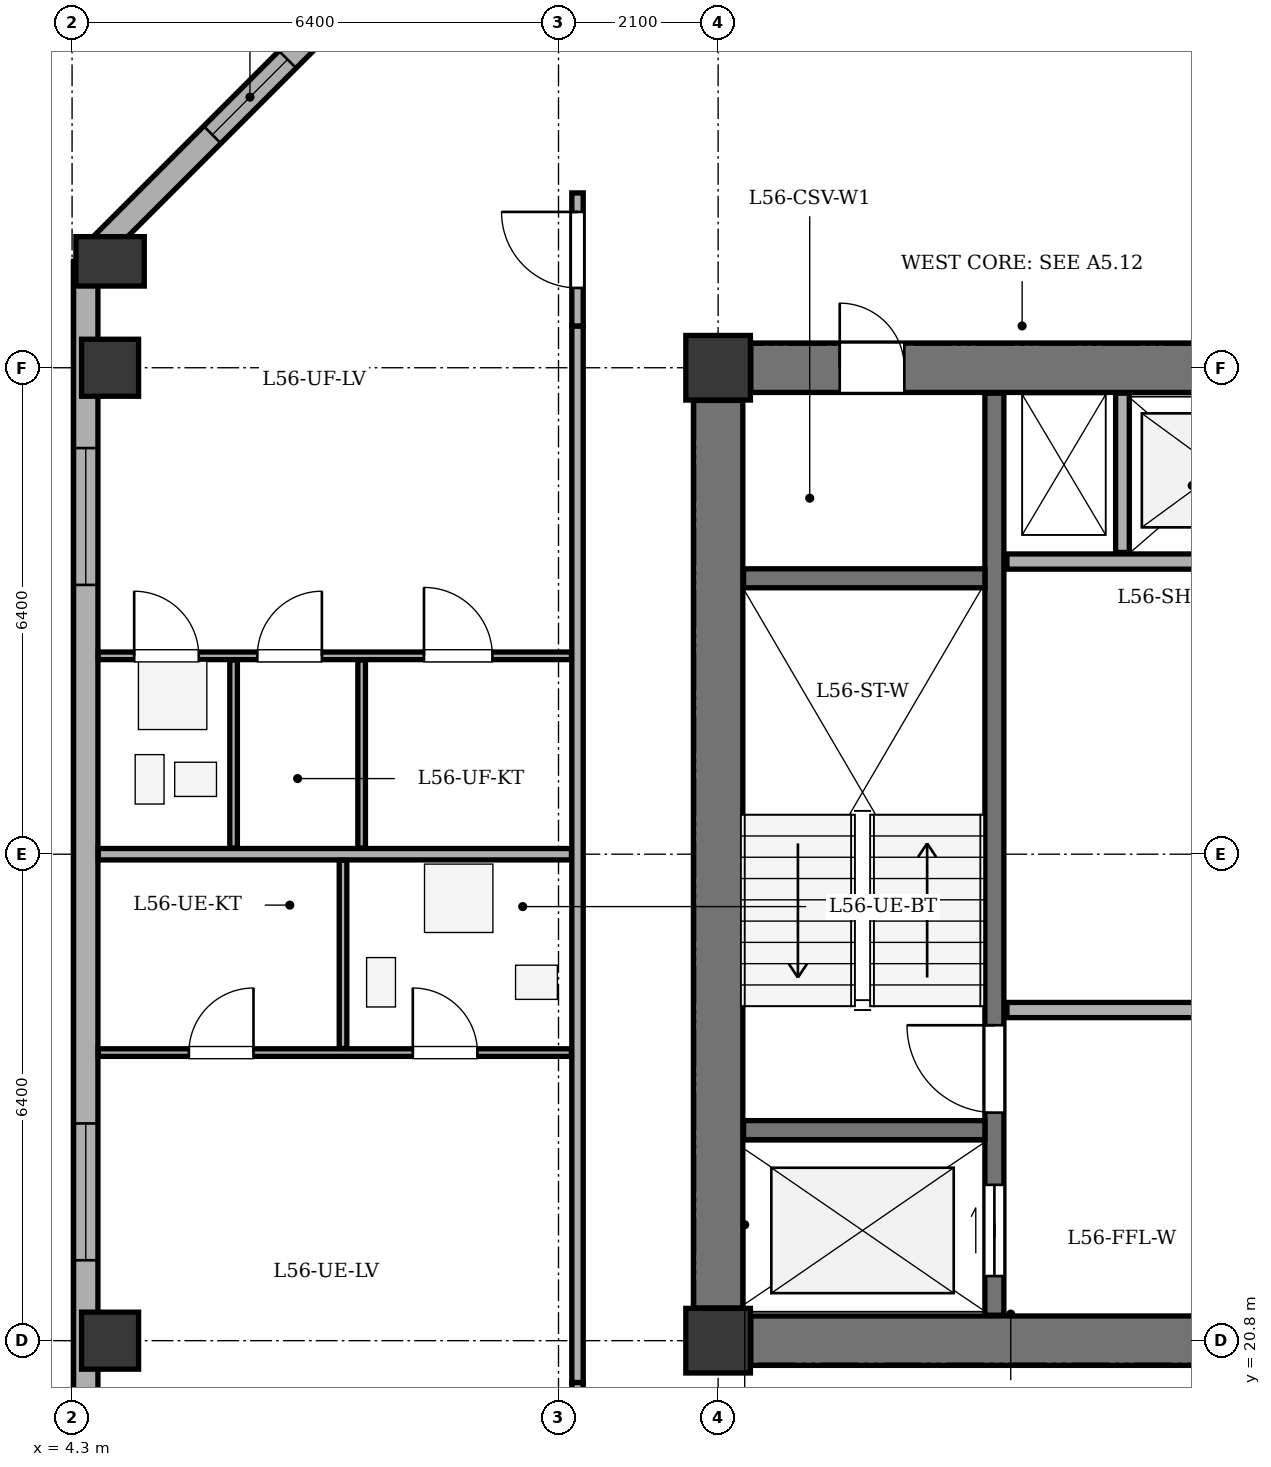
"""IFC4 building model, lengths in metres.
Left out: names, types, materials, properties, quantities, classifications, styles, units other than length and angle.
Written with IfcOpenShell. Run it as: python <this file> out.ifc"""

import sys

from ifc_helpers import new_model, si_unit, direction, frame, frame_2d, origin, origin_2d, place, context, subcontext, project, spatial, rectangle, extrude, element, fill, save


model = new_model("IFC4")
c1 = context("Model", 3, precision=1e-05, world=origin(), true_north=direction((0.0, 1.0)))
c2 = subcontext(c1, "Body", "Model", "MODEL_VIEW")
j1 = project(units=[si_unit("LENGTHUNIT", "METRE"), si_unit("PLANEANGLEUNIT", "RADIAN")], contexts=[c1])
p1 = place(None, origin())
s1 = spatial("IfcSite", under=j1, at=p1, CompositionType="ELEMENT")
p2 = place(p1, origin())
s2 = spatial("IfcBuilding", under=s1, at=p2, CompositionType="ELEMENT")
p3 = place(p2, frame((0.0, 0.0, 217.7)))
s3 = spatial("IfcBuildingStorey", under=s2, at=p3, CompositionType="ELEMENT", Elevation=217.7)
for number, where, z_axis, x_axis in (
    (1, (12.8, 20.8, 0.0), (0.0, 0.0, 1.0), (1.0, 0.0, 0.0)),
    (2, (12.8, 33.6, 0.0), (0.0, 0.0, 1.0), (1.0, 0.0, 0.0)),
):
    element("IfcColumn", number, at=place(p3, frame(where, z_axis=z_axis, x_axis=x_axis)), inside=s3, PredefinedType="COLUMN", context=c2, shape_type="SweptSolid", body=[
        extrude(rectangle(XDim=0.85, YDim=0.85, at=origin_2d()), origin(), (0.0, 0.0, 1.0), 3.4),
    ])
for number, where, z_axis, x_axis in (
    (3, (4.8, 20.8, 0.0), (0.0, 0.0, 1.0), (1.0, 0.0, 0.0)),
    (4, (4.8, 33.6, 0.0), (0.0, 0.0, 1.0), (1.0, 0.0, 0.0)),
):
    element("IfcColumn", number, at=place(p3, frame(where, z_axis=z_axis, x_axis=x_axis)), inside=s3, PredefinedType="COLUMN", context=c2, shape_type="SweptSolid", body=[
        extrude(rectangle(XDim=0.75, YDim=0.75, at=origin_2d()), origin(), (0.0, 0.0, 1.0), 3.4),
    ])
p4 = place(p3, frame((4.8, 35.0, 0.0), z_axis=(0.0, 0.0, 1.0), x_axis=(1.0, 0.0, 0.0)))
e5 = element("IfcColumn", 5, at=p4, inside=s3, PredefinedType="COLUMN", context=c2, shape_type="SweptSolid", body=[
    extrude(rectangle(XDim=0.65, YDim=0.9, at=origin_2d()), origin(), (0.0, 0.0, 1.0), 3.4),
])
p5 = place(p3, frame((4.48, 7.2, 0.0), z_axis=(0.0, 0.0, 1.0), x_axis=(0.0, 1.0, 0.0)))
e6 = element("IfcWall", 6, at=p5, inside=s3, PredefinedType="STANDARD", context=c2, shape_type="SweptSolid", body=[
    extrude(rectangle(XDim=27.8, YDim=0.32, at=frame_2d((13.9, 0.0))), origin(), (0.0, 0.0, 1.0), 2.725),
])
p6 = place(p5, frame((1.198, 0.0, 0.75)))
e7 = element("IfcOpeningElement", 7, at=p6, cuts=e6, PredefinedType="OPENING", context=c2, shape_type="SweptSolid", body=[
    extrude(rectangle(XDim=1.8, YDim=1.7, at=frame_2d((0.9, 0.85))), frame((0.0, 0.17, 0.0), z_axis=(0.0, -1.0, 0.0), x_axis=(1.0, 0.0, 0.0)), (0.0, 0.0, 1.0), 0.34),
])
p7 = place(p5, frame((3.78, 0.0, 0.75)))
e8 = element("IfcOpeningElement", 8, at=p7, cuts=e6, PredefinedType="OPENING", context=c2, shape_type="SweptSolid", body=[
    extrude(rectangle(XDim=1.8, YDim=1.7, at=frame_2d((0.9, 0.85))), frame((0.0, 0.17, 0.0), z_axis=(0.0, -1.0, 0.0), x_axis=(1.0, 0.0, 0.0)), (0.0, 0.0, 1.0), 0.34),
])
p8 = place(p5, frame((7.711, 0.0, 0.75)))
e9 = element("IfcOpeningElement", 9, at=p8, cuts=e6, PredefinedType="OPENING", context=c2, shape_type="SweptSolid", body=[
    extrude(rectangle(XDim=1.8, YDim=1.7, at=frame_2d((0.9, 0.85))), frame((0.0, 0.17, 0.0), z_axis=(0.0, -1.0, 0.0), x_axis=(1.0, 0.0, 0.0)), (0.0, 0.0, 1.0), 0.34),
])
p9 = place(p5, frame((10.542, 0.0, 0.75)))
e10 = element("IfcOpeningElement", 10, at=p9, cuts=e6, PredefinedType="OPENING", context=c2, shape_type="SweptSolid", body=[
    extrude(rectangle(XDim=1.8, YDim=1.7, at=frame_2d((0.9, 0.85))), frame((0.0, 0.17, 0.0), z_axis=(0.0, -1.0, 0.0), x_axis=(1.0, 0.0, 0.0)), (0.0, 0.0, 1.0), 0.34),
])
p10 = place(p5, frame((14.658, 0.0, 0.75)))
e11 = element("IfcOpeningElement", 11, at=p10, cuts=e6, PredefinedType="OPENING", context=c2, shape_type="SweptSolid", body=[
    extrude(rectangle(XDim=1.8, YDim=1.7, at=frame_2d((0.9, 0.85))), frame((0.0, 0.17, 0.0), z_axis=(0.0, -1.0, 0.0), x_axis=(1.0, 0.0, 0.0)), (0.0, 0.0, 1.0), 0.34),
])
p11 = place(p5, frame((23.543, 0.0, 0.75)))
e12 = element("IfcOpeningElement", 12, at=p11, cuts=e6, PredefinedType="OPENING", context=c2, shape_type="SweptSolid", body=[
    extrude(rectangle(XDim=1.8, YDim=1.7, at=frame_2d((0.9, 0.85))), frame((0.0, 0.17, 0.0), z_axis=(0.0, -1.0, 0.0), x_axis=(1.0, 0.0, 0.0)), (0.0, 0.0, 1.0), 0.34),
])
p12 = place(p3, frame((4.48, 35.0, 0.0), z_axis=(0.0, 0.0, 1.0), x_axis=(0.707106781187, 0.707106781187, 0.0)))
e13 = element("IfcWall", 13, at=p12, inside=s3, PredefinedType="STANDARD", context=c2, shape_type="SweptSolid", body=[
    extrude(rectangle(XDim=6.11, YDim=0.32, at=frame_2d((3.055, 0.0))), origin(), (0.0, 0.0, 1.0), 2.725),
])
p13 = place(p12, frame((2.355, 0.0, 0.75)))
e14 = element("IfcOpeningElement", 14, at=p13, cuts=e13, PredefinedType="OPENING", context=c2, shape_type="SweptSolid", body=[
    extrude(rectangle(XDim=1.4, YDim=1.65, at=frame_2d((0.7, 0.825))), frame((0.0, 0.17, 0.0), z_axis=(0.0, -1.0, 0.0), x_axis=(1.0, 0.0, 0.0)), (0.0, 0.0, 1.0), 0.34),
])
p14 = place(p3, frame((12.8, 21.23, 0.0), z_axis=(0.0, 0.0, 1.0), x_axis=(0.0, 1.0, 0.0)))
e15 = element("IfcWall", 15, at=p14, inside=s3, PredefinedType="SHEAR", context=c2, shape_type="SweptSolid", body=[
    extrude(rectangle(XDim=11.94, YDim=0.65, at=frame_2d((5.97, 0.0))), origin(), (0.0, 0.0, 1.0), 3.1),
])
p15 = place(p3, frame((13.23, 20.8, 0.0), z_axis=(0.0, 0.0, 1.0), x_axis=(1.0, 0.0, 0.0)))
e16 = element("IfcWall", 16, at=p15, inside=s3, PredefinedType="SHEAR", context=c2, shape_type="SweptSolid", body=[
    extrude(rectangle(XDim=7.14, YDim=0.65, at=frame_2d((3.57, 0.0))), origin(), (0.0, 0.0, 1.0), 3.1),
])
p16 = place(p3, frame((13.23, 33.6, 0.0), z_axis=(0.0, 0.0, 1.0), x_axis=(1.0, 0.0, 0.0)))
e17 = element("IfcWall", 17, at=p16, inside=s3, PredefinedType="SHEAR", context=c2, shape_type="SweptSolid", body=[
    extrude(rectangle(XDim=7.14, YDim=0.65, at=frame_2d((3.57, 0.0))), origin(), (0.0, 0.0, 1.0), 3.1),
])
p17 = place(p16, frame((1.17, 0.0, 0.0)))
e18 = element("IfcOpeningElement", 18, at=p17, cuts=e17, PredefinedType="OPENING", context=c2, shape_type="SweptSolid", body=[
    extrude(rectangle(XDim=0.85, YDim=2.02, at=frame_2d((0.425, 1.01))), frame((0.0, 0.335, 0.0), z_axis=(0.0, -1.0, 0.0), x_axis=(1.0, 0.0, 0.0)), (0.0, 0.0, 1.0), 0.67),
])
p18 = place(p3, frame((16.435, 21.135, 0.0), z_axis=(0.0, 0.0, 1.0), x_axis=(0.0, 1.0, 0.0)))
e19 = element("IfcWall", 19, at=p18, inside=s3, PredefinedType="SHEAR", context=c2, shape_type="SweptSolid", body=[
    extrude(rectangle(XDim=12.13, YDim=0.25, at=frame_2d((6.065, 0.0))), origin(), (0.0, 0.0, 1.0), 3.1),
])
p19 = place(p18, frame((0.515, 0.0, 0.0)))
e20 = element("IfcOpeningElement", 20, at=p19, cuts=e19, PredefinedType="OPENING", context=c2, shape_type="SweptSolid", body=[
    extrude(rectangle(XDim=1.2, YDim=2.15, at=frame_2d((0.6, 1.075))), frame((0.0, 0.135, 0.0), z_axis=(0.0, -1.0, 0.0), x_axis=(1.0, 0.0, 0.0)), (0.0, 0.0, 1.0), 0.27),
])
p20 = place(p18, frame((2.665, 0.0, 0.0)))
e21 = element("IfcOpeningElement", 21, at=p20, cuts=e19, PredefinedType="OPENING", context=c2, shape_type="SweptSolid", body=[
    extrude(rectangle(XDim=1.15, YDim=2.15, at=frame_2d((0.575, 1.075))), frame((0.0, 0.135, 0.0), z_axis=(0.0, -1.0, 0.0), x_axis=(1.0, 0.0, 0.0)), (0.0, 0.0, 1.0), 0.27),
])
for number, where, z_axis, x_axis in (
    (22, (13.135, 23.57, 0.0), (0.0, 0.0, 1.0), (1.0, 0.0, 0.0)),
    (23, (13.135, 30.83, 0.0), (0.0, 0.0, 1.0), (1.0, 0.0, 0.0)),
):
    element("IfcWall", number, at=place(p3, frame(where, z_axis=z_axis, x_axis=x_axis)), inside=s3, PredefinedType="SHEAR", context=c2, shape_type="SweptSolid", body=[
        extrude(rectangle(XDim=3.175, YDim=0.25, at=frame_2d((1.587, 0.0))), origin(), (0.0, 0.0, 1.0), 3.1),
    ])
for number, where, z_axis, x_axis in (
    (24, (16.6, 25.15, 0.0), (0.0, 0.0, 1.0), (1.0, 0.0, 0.0)),
    (25, (16.6, 31.05, 0.0), (0.0, 0.0, 1.0), (1.0, 0.0, 0.0)),
):
    element("IfcWall", number, at=place(p3, frame(where, z_axis=z_axis, x_axis=x_axis)), inside=s3, PredefinedType="SOLIDWALL", context=c2, shape_type="SweptSolid", body=[
        extrude(rectangle(XDim=3.85, YDim=0.2, at=frame_2d((1.925, 0.0))), origin(), (0.0, 0.0, 1.0), 3.1),
    ])
p21 = place(p3, frame((18.12, 31.17, 0.0), z_axis=(0.0, 0.0, 1.0), x_axis=(0.0, 1.0, 0.0)))
e26 = element("IfcWall", 26, at=p21, inside=s3, PredefinedType="PARTITIONING", context=c2, shape_type="SweptSolid", body=[
    extrude(rectangle(XDim=2.095, YDim=0.18, at=frame_2d((1.047, 0.0))), origin(), (0.0, 0.0, 1.0), 3.1),
])
p22 = place(p3, frame((10.95, 18.46, 0.0), z_axis=(0.0, 0.0, 1.0), x_axis=(0.0, 1.0, 0.0)))
e27 = element("IfcWall", 27, at=p22, inside=s3, PredefinedType="PARTITIONING", context=c2, shape_type="SweptSolid", body=[
    extrude(rectangle(XDim=1.79, YDim=0.15, at=frame_2d((0.895, 0.0))), origin(), (0.0, 0.0, 1.0), 3.1),
])
p23 = place(p22, frame((0.375, 0.0, 0.0)))
e28 = element("IfcOpeningElement", 28, at=p23, cuts=e27, PredefinedType="OPENING", context=c2, shape_type="SweptSolid", body=[
    extrude(rectangle(XDim=1.0, YDim=2.1, at=frame_2d((0.5, 1.05))), frame((0.0, 0.085, 0.0), z_axis=(0.0, -1.0, 0.0), x_axis=(1.0, 0.0, 0.0)), (0.0, 0.0, 1.0), 0.17),
])
p24 = place(p3, frame((10.95, 20.25, 0.0), z_axis=(0.0, 0.0, 1.0), x_axis=(0.0, 1.0, 0.0)))
e29 = element("IfcWall", 29, at=p24, inside=s3, PredefinedType="PARTITIONING", context=c2, shape_type="SweptSolid", body=[
    extrude(rectangle(XDim=13.9, YDim=0.15, at=frame_2d((6.95, 0.0))), origin(), (0.0, 0.0, 1.0), 3.1),
])
p25 = place(p3, frame((10.95, 34.15, 0.0), z_axis=(0.0, 0.0, 1.0), x_axis=(0.0, 1.0, 0.0)))
e30 = element("IfcWall", 30, at=p25, inside=s3, PredefinedType="PARTITIONING", context=c2, shape_type="SweptSolid", body=[
    extrude(rectangle(XDim=1.75, YDim=0.15, at=frame_2d((0.875, 0.0))), origin(), (0.0, 0.0, 1.0), 3.1),
])
p26 = place(p25, frame((0.5, 0.0, 0.0)))
e31 = element("IfcOpeningElement", 31, at=p26, cuts=e30, PredefinedType="OPENING", context=c2, shape_type="SweptSolid", body=[
    extrude(rectangle(XDim=1.0, YDim=2.1, at=frame_2d((0.5, 1.05))), frame((0.0, 0.085, 0.0), z_axis=(0.0, -1.0, 0.0), x_axis=(1.0, 0.0, 0.0)), (0.0, 0.0, 1.0), 0.17),
])
p27 = place(p3, frame((4.645, 27.2, 0.0), z_axis=(0.0, 0.0, 1.0), x_axis=(1.0, 0.0, 0.0)))
e32 = element("IfcWall", 32, at=p27, inside=s3, PredefinedType="PARTITIONING", context=c2, shape_type="SweptSolid", body=[
    extrude(rectangle(XDim=6.225, YDim=0.15, at=frame_2d((3.113, 0.0))), origin(), (0.0, 0.0, 1.0), 2.725),
])
p28 = place(p3, frame((4.645, 24.59, 0.0), z_axis=(0.0, 0.0, 1.0), x_axis=(1.0, 0.0, 0.0)))
e33 = element("IfcWall", 33, at=p28, inside=s3, PredefinedType="PARTITIONING", context=c2, shape_type="SweptSolid", body=[
    extrude(rectangle(XDim=6.225, YDim=0.1, at=frame_2d((3.113, 0.0))), origin(), (0.0, 0.0, 1.0), 3.1),
])
p29 = place(p28, frame((1.192, 0.0, 0.0)))
e34 = element("IfcOpeningElement", 34, at=p29, cuts=e33, PredefinedType="OPENING", context=c2, shape_type="SweptSolid", body=[
    extrude(rectangle(XDim=0.85, YDim=2.05, at=frame_2d((0.425, 1.025))), frame((0.0, 0.06, 0.0), z_axis=(0.0, -1.0, 0.0), x_axis=(1.0, 0.0, 0.0)), (0.0, 0.0, 1.0), 0.12),
])
p30 = place(p28, frame((4.138, 0.0, 0.0)))
e35 = element("IfcOpeningElement", 35, at=p30, cuts=e33, PredefinedType="OPENING", context=c2, shape_type="SweptSolid", body=[
    extrude(rectangle(XDim=0.85, YDim=2.05, at=frame_2d((0.425, 1.025))), frame((0.0, 0.06, 0.0), z_axis=(0.0, -1.0, 0.0), x_axis=(1.0, 0.0, 0.0)), (0.0, 0.0, 1.0), 0.12),
])
p31 = place(p3, frame((7.865, 24.645, 0.0), z_axis=(0.0, 0.0, 1.0), x_axis=(0.0, 1.0, 0.0)))
e36 = element("IfcWall", 36, at=p31, inside=s3, PredefinedType="PARTITIONING", context=c2, shape_type="SweptSolid", body=[
    extrude(rectangle(XDim=2.475, YDim=0.1, at=frame_2d((1.238, 0.0))), origin(), (0.0, 0.0, 1.0), 3.1),
])
p32 = place(p3, frame((4.645, 29.81, 0.0), z_axis=(0.0, 0.0, 1.0), x_axis=(1.0, 0.0, 0.0)))
e37 = element("IfcWall", 37, at=p32, inside=s3, PredefinedType="PARTITIONING", context=c2, shape_type="SweptSolid", body=[
    extrude(rectangle(XDim=6.225, YDim=0.1, at=frame_2d((3.113, 0.0))), origin(), (0.0, 0.0, 1.0), 3.1),
])
p33 = place(p32, frame((0.472, 0.0, 0.0)))
e38 = element("IfcOpeningElement", 38, at=p33, cuts=e37, PredefinedType="OPENING", context=c2, shape_type="SweptSolid", body=[
    extrude(rectangle(XDim=0.85, YDim=2.05, at=frame_2d((0.425, 1.025))), frame((0.0, 0.06, 0.0), z_axis=(0.0, -1.0, 0.0), x_axis=(1.0, 0.0, 0.0)), (0.0, 0.0, 1.0), 0.12),
])
p34 = place(p32, frame((2.092, 0.0, 0.0)))
e39 = element("IfcOpeningElement", 39, at=p34, cuts=e37, PredefinedType="OPENING", context=c2, shape_type="SweptSolid", body=[
    extrude(rectangle(XDim=0.85, YDim=2.05, at=frame_2d((0.425, 1.025))), frame((0.0, 0.06, 0.0), z_axis=(0.0, -1.0, 0.0), x_axis=(1.0, 0.0, 0.0)), (0.0, 0.0, 1.0), 0.12),
])
p35 = place(p32, frame((4.285, 0.0, 0.0)))
e40 = element("IfcOpeningElement", 40, at=p35, cuts=e37, PredefinedType="OPENING", context=c2, shape_type="SweptSolid", body=[
    extrude(rectangle(XDim=0.9, YDim=2.05, at=frame_2d((0.45, 1.025))), frame((0.0, 0.06, 0.0), z_axis=(0.0, -1.0, 0.0), x_axis=(1.0, 0.0, 0.0)), (0.0, 0.0, 1.0), 0.12),
])
for number, where, z_axis, x_axis in (
    (41, (6.425, 27.28, 0.0), (0.0, 0.0, 1.0), (0.0, 1.0, 0.0)),
    (42, (8.11, 27.28, 0.0), (0.0, 0.0, 1.0), (0.0, 1.0, 0.0)),
):
    element("IfcWall", number, at=place(p3, frame(where, z_axis=z_axis, x_axis=x_axis)), inside=s3, PredefinedType="PARTITIONING", context=c2, shape_type="SweptSolid", body=[
        extrude(rectangle(XDim=2.475, YDim=0.1, at=frame_2d((1.237, 0.0))), origin(), (0.0, 0.0, 1.0), 3.1),
    ])
p36 = place(p10, origin())
e43 = element("IfcWindow", 43, at=p36, inside=s3, PartitioningType="SINGLE_PANEL", PredefinedType="WINDOW", context=c2, shape_type="SweptSolid", body=[
    extrude(rectangle(XDim=1.8, YDim=1.7, at=frame_2d((0.9, 0.85))), frame((0.0, -0.01, 0.0), z_axis=(0.0, -1.0, 0.0), x_axis=(1.0, 0.0, 0.0)), (0.0, 0.0, 1.0), 0.06),
])
fill(e11, e43)
p37 = place(p11, origin())
e44 = element("IfcWindow", 44, at=p37, inside=s3, PartitioningType="SINGLE_PANEL", PredefinedType="WINDOW", context=c2, shape_type="SweptSolid", body=[
    extrude(rectangle(XDim=1.8, YDim=1.7, at=frame_2d((0.9, 0.85))), frame((0.0, -0.01, 0.0), z_axis=(0.0, -1.0, 0.0), x_axis=(1.0, 0.0, 0.0)), (0.0, 0.0, 1.0), 0.06),
])
fill(e12, e44)
p38 = place(p13, origin())
e45 = element("IfcWindow", 45, at=p38, inside=s3, PartitioningType="SINGLE_PANEL", PredefinedType="WINDOW", context=c2, shape_type="SweptSolid", body=[
    extrude(rectangle(XDim=1.4, YDim=1.65, at=frame_2d((0.7, 0.825))), frame((0.0, -0.01, 0.0), z_axis=(0.0, -1.0, 0.0), x_axis=(1.0, 0.0, 0.0)), (0.0, 0.0, 1.0), 0.06),
])
fill(e14, e45)
p39 = place(p17, origin())
e46 = element("IfcDoor", 46, at=p39, inside=s3, OperationType="SINGLE_SWING_LEFT", PredefinedType="DOOR", context=c2, shape_type="SweptSolid", body=[
    extrude(rectangle(XDim=0.85, YDim=2.02, at=frame_2d((0.425, 1.01))), frame((0.0, 0.025, 0.0), z_axis=(0.0, -1.0, 0.0), x_axis=(1.0, 0.0, 0.0)), (0.0, 0.0, 1.0), 0.05),
])
fill(e18, e46)
p40 = place(p19, origin())
e47 = element("IfcDoor", 47, at=p40, inside=s3, OperationType="DOUBLE_DOOR_SLIDING", PredefinedType="DOOR", context=c2, shape_type="SweptSolid", body=[
    extrude(rectangle(XDim=1.2, YDim=2.15, at=frame_2d((0.6, 1.075))), frame((0.0, 0.025, 0.0), z_axis=(0.0, -1.0, 0.0), x_axis=(1.0, 0.0, 0.0)), (0.0, 0.0, 1.0), 0.05),
])
fill(e20, e47)
p41 = place(p20, origin())
e48 = element("IfcDoor", 48, at=p41, inside=s3, OperationType="SINGLE_SWING_RIGHT", PredefinedType="DOOR", context=c2, shape_type="SweptSolid", body=[
    extrude(rectangle(XDim=1.15, YDim=2.15, at=frame_2d((0.575, 1.075))), frame((0.0, 0.025, 0.0), z_axis=(0.0, -1.0, 0.0), x_axis=(1.0, 0.0, 0.0)), (0.0, 0.0, 1.0), 0.05),
])
fill(e21, e48)
p42 = place(p29, origin())
e49 = element("IfcDoor", 49, at=p42, inside=s3, OperationType="SINGLE_SWING_RIGHT", PredefinedType="DOOR", context=c2, shape_type="SweptSolid", body=[
    extrude(rectangle(XDim=0.85, YDim=2.05, at=frame_2d((0.425, 1.025))), frame((0.0, 0.025, 0.0), z_axis=(0.0, -1.0, 0.0), x_axis=(1.0, 0.0, 0.0)), (0.0, 0.0, 1.0), 0.05),
])
fill(e34, e49)
p43 = place(p30, origin())
e50 = element("IfcDoor", 50, at=p43, inside=s3, OperationType="SINGLE_SWING_LEFT", PredefinedType="DOOR", context=c2, shape_type="SweptSolid", body=[
    extrude(rectangle(XDim=0.85, YDim=2.05, at=frame_2d((0.425, 1.025))), frame((0.0, 0.025, 0.0), z_axis=(0.0, -1.0, 0.0), x_axis=(1.0, 0.0, 0.0)), (0.0, 0.0, 1.0), 0.05),
])
fill(e35, e50)
p44 = place(p26, origin())
e51 = element("IfcDoor", 51, at=p44, inside=s3, OperationType="SINGLE_SWING_RIGHT", PredefinedType="DOOR", context=c2, shape_type="SweptSolid", body=[
    extrude(rectangle(XDim=1.0, YDim=2.1, at=frame_2d((0.5, 1.05))), frame((0.0, 0.025, 0.0), z_axis=(0.0, -1.0, 0.0), x_axis=(1.0, 0.0, 0.0)), (0.0, 0.0, 1.0), 0.05),
])
fill(e31, e51)
p45 = place(p33, origin())
e52 = element("IfcDoor", 52, at=p45, inside=s3, OperationType="SINGLE_SWING_LEFT", PredefinedType="DOOR", context=c2, shape_type="SweptSolid", body=[
    extrude(rectangle(XDim=0.85, YDim=2.05, at=frame_2d((0.425, 1.025))), frame((0.0, 0.025, 0.0), z_axis=(0.0, -1.0, 0.0), x_axis=(1.0, 0.0, 0.0)), (0.0, 0.0, 1.0), 0.05),
])
fill(e38, e52)
p46 = place(p34, origin())
e53 = element("IfcDoor", 53, at=p46, inside=s3, OperationType="SINGLE_SWING_RIGHT", PredefinedType="DOOR", context=c2, shape_type="SweptSolid", body=[
    extrude(rectangle(XDim=0.85, YDim=2.05, at=frame_2d((0.425, 1.025))), frame((0.0, 0.025, 0.0), z_axis=(0.0, -1.0, 0.0), x_axis=(1.0, 0.0, 0.0)), (0.0, 0.0, 1.0), 0.05),
])
fill(e39, e53)
p47 = place(p35, origin())
e54 = element("IfcDoor", 54, at=p47, inside=s3, OperationType="SINGLE_SWING_LEFT", PredefinedType="DOOR", context=c2, shape_type="SweptSolid", body=[
    extrude(rectangle(XDim=0.9, YDim=2.05, at=frame_2d((0.45, 1.025))), frame((0.0, 0.025, 0.0), z_axis=(0.0, -1.0, 0.0), x_axis=(1.0, 0.0, 0.0)), (0.0, 0.0, 1.0), 0.05),
])
fill(e40, e54)
save(model, sys.argv[1])
